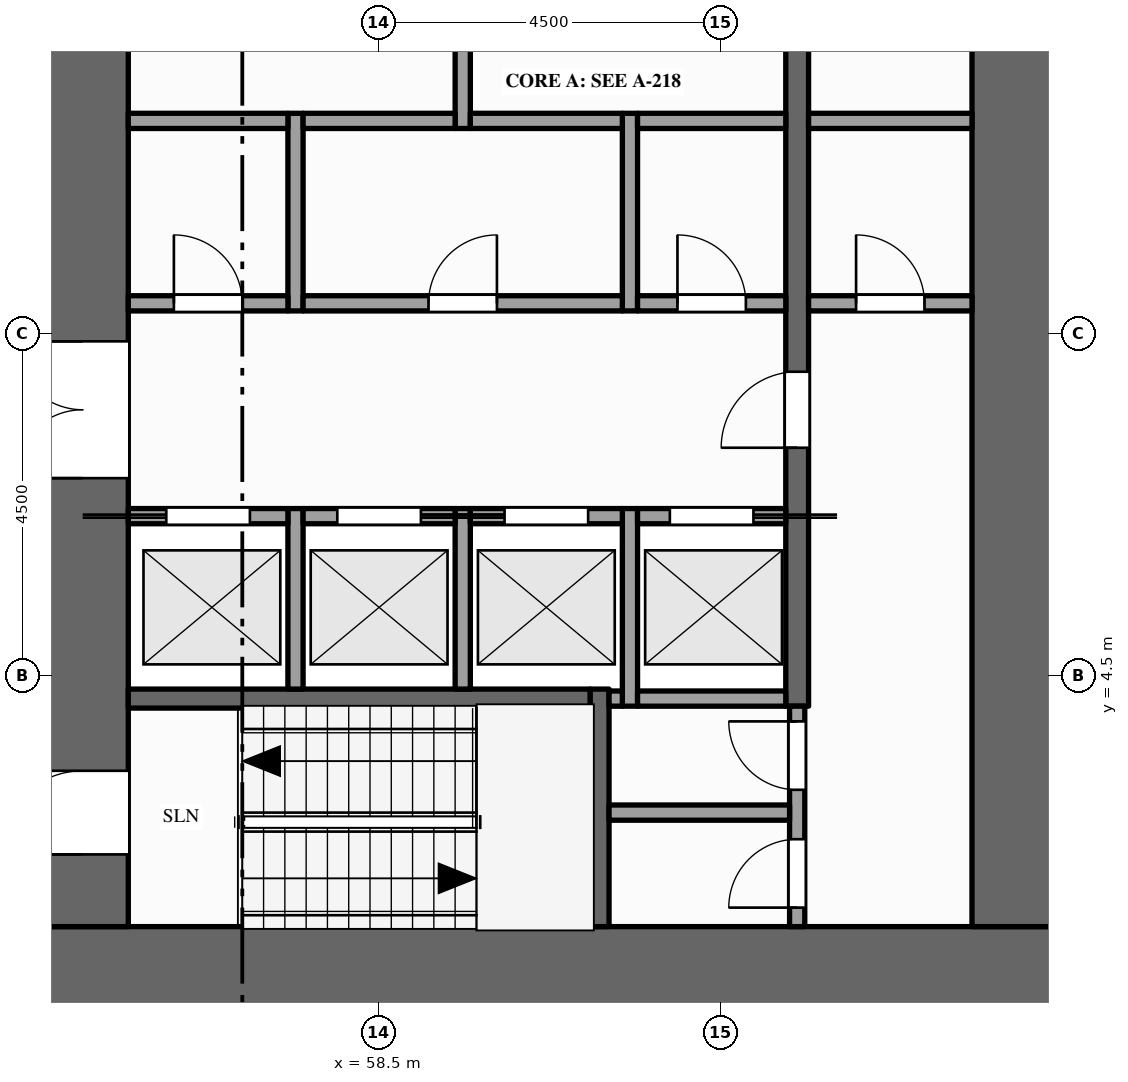
"""IFC4 building model, lengths in metres.
Left out: names, types, materials, properties, quantities, classifications, styles, units other than length and angle.
Written with IfcOpenShell. Run it as: python <this file> out.ifc"""

import sys

from ifc_helpers import new_model, si_unit, direction, frame, frame_2d, origin, place, context, subcontext, project, spatial, rectangle, extrude, element, fill, save


model = new_model("IFC4")
c1 = context("Model", 3, precision=1e-05, world=origin(), true_north=direction((0.0, 1.0)))
c2 = subcontext(c1, "Body", "Model", "MODEL_VIEW")
j1 = project(units=[si_unit("LENGTHUNIT", "METRE"), si_unit("PLANEANGLEUNIT", "RADIAN")], contexts=[c1])
p1 = place(None, origin())
s1 = spatial("IfcSite", under=j1, at=p1, CompositionType="ELEMENT")
p2 = place(p1, origin())
s2 = spatial("IfcBuilding", under=s1, at=p2, CompositionType="ELEMENT")
p3 = place(p2, frame((0.0, 0.0, 103.0)))
s3 = spatial("IfcBuildingStorey", under=s2, at=p3, CompositionType="ELEMENT", Elevation=103.0)
p4 = place(p3, frame((67.5, 0.6, -0.15), z_axis=(0.0, 0.0, 1.0), x_axis=(-1.0, 0.0, 0.0)))
e1 = element("IfcWall", 1, at=p4, inside=s3, PredefinedType="SHEAR", context=c2, shape_type="SweptSolid", body=[
    extrude(rectangle(XDim=13.5, YDim=1.2, at=frame_2d((6.75, 0.0))), origin(), (0.0, 0.0, 1.0), 4.0),
])
p5 = place(p3, frame((54.6, 1.2, -0.15), z_axis=(0.0, 0.0, 1.0), x_axis=(0.0, 1.0, 0.0)))
e2 = element("IfcWall", 2, at=p5, inside=s3, PredefinedType="SHEAR", context=c2, shape_type="SweptSolid", body=[
    extrude(rectangle(XDim=20.1, YDim=1.2, at=frame_2d((10.05, 0.0))), origin(), (0.0, 0.0, 1.0), 4.0),
])
p6 = place(p5, frame((5.9, 0.0, 0.15)))
e3 = element("IfcOpeningElement", 3, at=p6, cuts=e2, PredefinedType="OPENING", context=c2, shape_type="SweptSolid", body=[
    extrude(rectangle(XDim=1.8, YDim=2.1, at=frame_2d((0.9, 1.05))), frame((0.0, 0.61, 0.0), z_axis=(0.0, -1.0, 0.0), x_axis=(1.0, 0.0, 0.0)), (0.0, 0.0, 1.0), 1.22),
])
p7 = place(p5, frame((11.95, 0.0, 0.15)))
e4 = element("IfcOpeningElement", 4, at=p7, cuts=e2, PredefinedType="OPENING", context=c2, shape_type="SweptSolid", body=[
    extrude(rectangle(XDim=1.1, YDim=2.1, at=frame_2d((0.55, 1.05))), frame((0.0, 0.61, 0.0), z_axis=(0.0, -1.0, 0.0), x_axis=(1.0, 0.0, 0.0)), (0.0, 0.0, 1.0), 1.22),
])
p8 = place(p5, frame((0.95, 0.0, 0.15)))
e5 = element("IfcOpeningElement", 5, at=p8, cuts=e2, PredefinedType="OPENING", context=c2, shape_type="SweptSolid", body=[
    extrude(rectangle(XDim=1.1, YDim=2.1, at=frame_2d((0.55, 1.05))), frame((0.0, 0.61, 0.0), z_axis=(0.0, -1.0, 0.0), x_axis=(1.0, 0.0, 0.0)), (0.0, 0.0, 1.0), 1.22),
])
p9 = place(p5, frame((18.15, 0.0, 0.15)))
e6 = element("IfcOpeningElement", 6, at=p9, cuts=e2, PredefinedType="OPENING", context=c2, shape_type="SweptSolid", body=[
    extrude(rectangle(XDim=1.1, YDim=2.1, at=frame_2d((0.55, 1.05))), frame((0.0, 0.61, 0.0), z_axis=(0.0, -1.0, 0.0), x_axis=(1.0, 0.0, 0.0)), (0.0, 0.0, 1.0), 1.22),
])
p10 = place(p3, frame((66.9, 1.2, -0.15), z_axis=(0.0, 0.0, 1.0), x_axis=(0.0, 1.0, 0.0)))
e7 = element("IfcWall", 7, at=p10, inside=s3, PredefinedType="SHEAR", context=c2, shape_type="SweptSolid", body=[
    extrude(rectangle(XDim=20.1, YDim=1.2, at=frame_2d((10.05, 0.0))), origin(), (0.0, 0.0, 1.0), 4.0),
])
p11 = place(p3, frame((57.4, 4.325, 0.0), z_axis=(0.0, 0.0, 1.0), x_axis=(0.0, 1.0, 0.0)))
e8 = element("IfcWall", 8, at=p11, inside=s3, PredefinedType="SOLIDWALL", context=c2, shape_type="SweptSolid", body=[
    extrude(rectangle(XDim=2.375, YDim=0.2, at=frame_2d((1.188, 0.0))), origin(), (0.0, 0.0, 1.0), 3.85),
])
p12 = place(p3, frame((57.4, 9.3, 0.0), z_axis=(0.0, 0.0, 1.0), x_axis=(0.0, 1.0, 0.0)))
e9 = element("IfcWall", 9, at=p12, inside=s3, PredefinedType="PARTITIONING", context=c2, shape_type="SweptSolid", body=[
    extrude(rectangle(XDim=2.6, YDim=0.2, at=frame_2d((1.3, 0.0))), origin(), (0.0, 0.0, 1.0), 3.85),
])
p13 = place(p3, frame((59.6, 4.325, 0.0), z_axis=(0.0, 0.0, 1.0), x_axis=(0.0, 1.0, 0.0)))
e10 = element("IfcWall", 10, at=p13, inside=s3, PredefinedType="SOLIDWALL", context=c2, shape_type="SweptSolid", body=[
    extrude(rectangle(XDim=2.375, YDim=0.2, at=frame_2d((1.188, 0.0))), origin(), (0.0, 0.0, 1.0), 3.85),
])
p14 = place(p3, frame((59.6, 11.7, 0.0), z_axis=(0.0, 0.0, 1.0), x_axis=(0.0, 1.0, 0.0)))
e11 = element("IfcWall", 11, at=p14, inside=s3, PredefinedType="PARTITIONING", context=c2, shape_type="SweptSolid", body=[
    extrude(rectangle(XDim=3.8, YDim=0.2, at=frame_2d((1.9, 0.0))), origin(), (0.0, 0.0, 1.0), 3.85),
])
p15 = place(p14, frame((1.5, 0.0, 0.0)))
e12 = element("IfcOpeningElement", 12, at=p15, cuts=e11, PredefinedType="OPENING", context=c2, shape_type="SweptSolid", body=[
    extrude(rectangle(XDim=1.0, YDim=2.1, at=frame_2d((0.5, 1.05))), frame((0.0, 0.11, 0.0), z_axis=(0.0, -1.0, 0.0), x_axis=(1.0, 0.0, 0.0)), (0.0, 0.0, 1.0), 0.22),
])
p16 = place(p3, frame((61.4, 1.2, 0.0), z_axis=(0.0, 0.0, 1.0), x_axis=(0.0, 1.0, 0.0)))
e13 = element("IfcWall", 13, at=p16, inside=s3, PredefinedType="SHEAR", context=c2, shape_type="SweptSolid", body=[
    extrude(rectangle(XDim=3.125, YDim=0.25, at=frame_2d((1.562, 0.0))), origin(), (0.0, 0.0, 1.0), 3.85),
])
p17 = place(p3, frame((61.8, 4.1, 0.0), z_axis=(0.0, 0.0, 1.0), x_axis=(0.0, 1.0, 0.0)))
e14 = element("IfcWall", 14, at=p17, inside=s3, PredefinedType="SOLIDWALL", context=c2, shape_type="SweptSolid", body=[
    extrude(rectangle(XDim=2.6, YDim=0.2, at=frame_2d((1.3, 0.0))), origin(), (0.0, 0.0, 1.0), 3.85),
])
p18 = place(p3, frame((61.8, 9.3, 0.0), z_axis=(0.0, 0.0, 1.0), x_axis=(0.0, 1.0, 0.0)))
e15 = element("IfcWall", 15, at=p18, inside=s3, PredefinedType="PARTITIONING", context=c2, shape_type="SweptSolid", body=[
    extrude(rectangle(XDim=2.6, YDim=0.2, at=frame_2d((1.3, 0.0))), origin(), (0.0, 0.0, 1.0), 3.85),
])
p19 = place(p3, frame((64.0, 1.2, 0.0), z_axis=(0.0, 0.0, 1.0), x_axis=(0.0, 1.0, 0.0)))
e16 = element("IfcWall", 16, at=p19, inside=s3, PredefinedType="PARTITIONING", context=c2, shape_type="SweptSolid", body=[
    extrude(rectangle(XDim=2.9, YDim=0.2, at=frame_2d((1.45, 0.0))), origin(), (0.0, 0.0, 1.0), 3.85),
])
p20 = place(p19, frame((0.25, 0.0, 0.0)))
e17 = element("IfcOpeningElement", 17, at=p20, cuts=e16, PredefinedType="OPENING", context=c2, shape_type="SweptSolid", body=[
    extrude(rectangle(XDim=0.9, YDim=2.1, at=frame_2d((0.45, 1.05))), frame((0.0, 0.11, 0.0), z_axis=(0.0, -1.0, 0.0), x_axis=(1.0, 0.0, 0.0)), (0.0, 0.0, 1.0), 0.22),
])
p21 = place(p19, frame((1.8, 0.0, 0.0)))
e18 = element("IfcOpeningElement", 18, at=p21, cuts=e16, PredefinedType="OPENING", context=c2, shape_type="SweptSolid", body=[
    extrude(rectangle(XDim=0.9, YDim=2.1, at=frame_2d((0.45, 1.05))), frame((0.0, 0.11, 0.0), z_axis=(0.0, -1.0, 0.0), x_axis=(1.0, 0.0, 0.0)), (0.0, 0.0, 1.0), 0.22),
])
p22 = place(p3, frame((64.0, 4.1, 0.0), z_axis=(0.0, 0.0, 1.0), x_axis=(0.0, 1.0, 0.0)))
e19 = element("IfcWall", 19, at=p22, inside=s3, PredefinedType="SHEAR", context=c2, shape_type="SweptSolid", body=[
    extrude(rectangle(XDim=14.5, YDim=0.3, at=frame_2d((7.25, 0.0))), origin(), (0.0, 0.0, 1.0), 3.85),
])
p23 = place(p22, frame((3.4, 0.0, 0.0)))
e20 = element("IfcOpeningElement", 20, at=p23, cuts=e19, PredefinedType="OPENING", context=c2, shape_type="SweptSolid", body=[
    extrude(rectangle(XDim=1.0, YDim=2.1, at=frame_2d((0.5, 1.05))), frame((0.0, 0.16, 0.0), z_axis=(0.0, -1.0, 0.0), x_axis=(1.0, 0.0, 0.0)), (0.0, 0.0, 1.0), 0.32),
])
p24 = place(p22, frame((9.1, 0.0, 0.0)))
e21 = element("IfcOpeningElement", 21, at=p24, cuts=e19, PredefinedType="OPENING", context=c2, shape_type="SweptSolid", body=[
    extrude(rectangle(XDim=1.0, YDim=2.1, at=frame_2d((0.5, 1.05))), frame((0.0, 0.16, 0.0), z_axis=(0.0, -1.0, 0.0), x_axis=(1.0, 0.0, 0.0)), (0.0, 0.0, 1.0), 0.32),
])
p25 = place(p3, frame((61.525, 2.7, 0.0), z_axis=(0.0, 0.0, 1.0), x_axis=(1.0, 0.0, 0.0)))
e22 = element("IfcWall", 22, at=p25, inside=s3, PredefinedType="PARTITIONING", context=c2, shape_type="SweptSolid", body=[
    extrude(rectangle(XDim=2.375, YDim=0.2, at=frame_2d((1.188, 0.0))), origin(), (0.0, 0.0, 1.0), 3.85),
])
p26 = place(p3, frame((55.2, 4.2, 0.0), z_axis=(0.0, 0.0, 1.0), x_axis=(1.0, 0.0, 0.0)))
e23 = element("IfcWall", 23, at=p26, inside=s3, PredefinedType="SHEAR", context=c2, shape_type="SweptSolid", body=[
    extrude(rectangle(XDim=6.075, YDim=0.25, at=frame_2d((3.038, 0.0))), origin(), (0.0, 0.0, 1.0), 3.85),
])
p27 = place(p3, frame((61.525, 4.2, 0.0), z_axis=(0.0, 0.0, 1.0), x_axis=(1.0, 0.0, 0.0)))
e24 = element("IfcWall", 24, at=p27, inside=s3, PredefinedType="SOLIDWALL", context=c2, shape_type="SweptSolid", body=[
    extrude(rectangle(XDim=0.175, YDim=0.2, at=frame_2d((0.087, 0.0))), origin(), (0.0, 0.0, 1.0), 3.85),
])
p28 = place(p3, frame((61.9, 4.2, 0.0), z_axis=(0.0, 0.0, 1.0), x_axis=(1.0, 0.0, 0.0)))
e25 = element("IfcWall", 25, at=p28, inside=s3, PredefinedType="SOLIDWALL", context=c2, shape_type="SweptSolid", body=[
    extrude(rectangle(XDim=1.95, YDim=0.2, at=frame_2d((0.975, 0.0))), origin(), (0.0, 0.0, 1.0), 3.85),
])
p29 = place(p3, frame((55.2, 6.6, 0.0), z_axis=(0.0, 0.0, 1.0), x_axis=(1.0, 0.0, 0.0)))
e26 = element("IfcWall", 26, at=p29, inside=s3, PredefinedType="SOLIDWALL", context=c2, shape_type="SweptSolid", body=[
    extrude(rectangle(XDim=2.1, YDim=0.2, at=frame_2d((1.05, 0.0))), origin(), (0.0, 0.0, 1.0), 3.85),
])
p30 = place(p29, frame((0.5, 0.0, 0.012)))
e27 = element("IfcOpeningElement", 27, at=p30, cuts=e26, PredefinedType="OPENING", context=c2, shape_type="SweptSolid", body=[
    extrude(rectangle(XDim=1.1, YDim=2.1, at=frame_2d((0.55, 1.05))), frame((0.0, 0.11, 0.0), z_axis=(0.0, -1.0, 0.0), x_axis=(1.0, 0.0, 0.0)), (0.0, 0.0, 1.0), 0.22),
])
p31 = place(p3, frame((57.5, 6.6, 0.0), z_axis=(0.0, 0.0, 1.0), x_axis=(1.0, 0.0, 0.0)))
e28 = element("IfcWall", 28, at=p31, inside=s3, PredefinedType="SOLIDWALL", context=c2, shape_type="SweptSolid", body=[
    extrude(rectangle(XDim=2.0, YDim=0.2, at=frame_2d((1.0, 0.0))), origin(), (0.0, 0.0, 1.0), 3.85),
])
p32 = place(p31, frame((0.45, 0.0, 0.012)))
e29 = element("IfcOpeningElement", 29, at=p32, cuts=e28, PredefinedType="OPENING", context=c2, shape_type="SweptSolid", body=[
    extrude(rectangle(XDim=1.1, YDim=2.1, at=frame_2d((0.55, 1.05))), frame((0.0, 0.11, 0.0), z_axis=(0.0, -1.0, 0.0), x_axis=(1.0, 0.0, 0.0)), (0.0, 0.0, 1.0), 0.22),
])
p33 = place(p3, frame((59.7, 6.6, 0.0), z_axis=(0.0, 0.0, 1.0), x_axis=(1.0, 0.0, 0.0)))
e30 = element("IfcWall", 30, at=p33, inside=s3, PredefinedType="SOLIDWALL", context=c2, shape_type="SweptSolid", body=[
    extrude(rectangle(XDim=2.0, YDim=0.2, at=frame_2d((1.0, 0.0))), origin(), (0.0, 0.0, 1.0), 3.85),
])
p34 = place(p33, frame((0.45, 0.0, 0.012)))
e31 = element("IfcOpeningElement", 31, at=p34, cuts=e30, PredefinedType="OPENING", context=c2, shape_type="SweptSolid", body=[
    extrude(rectangle(XDim=1.1, YDim=2.1, at=frame_2d((0.55, 1.05))), frame((0.0, 0.11, 0.0), z_axis=(0.0, -1.0, 0.0), x_axis=(1.0, 0.0, 0.0)), (0.0, 0.0, 1.0), 0.22),
])
p35 = place(p3, frame((61.9, 6.6, 0.0), z_axis=(0.0, 0.0, 1.0), x_axis=(1.0, 0.0, 0.0)))
e32 = element("IfcWall", 32, at=p35, inside=s3, PredefinedType="SOLIDWALL", context=c2, shape_type="SweptSolid", body=[
    extrude(rectangle(XDim=1.95, YDim=0.2, at=frame_2d((0.975, 0.0))), origin(), (0.0, 0.0, 1.0), 3.85),
])
p36 = place(p35, frame((0.425, 0.0, 0.012)))
e33 = element("IfcOpeningElement", 33, at=p36, cuts=e32, PredefinedType="OPENING", context=c2, shape_type="SweptSolid", body=[
    extrude(rectangle(XDim=1.1, YDim=2.1, at=frame_2d((0.55, 1.05))), frame((0.0, 0.11, 0.0), z_axis=(0.0, -1.0, 0.0), x_axis=(1.0, 0.0, 0.0)), (0.0, 0.0, 1.0), 0.22),
])
p37 = place(p3, frame((55.2, 9.4, 0.0), z_axis=(0.0, 0.0, 1.0), x_axis=(1.0, 0.0, 0.0)))
e34 = element("IfcWall", 34, at=p37, inside=s3, PredefinedType="PARTITIONING", context=c2, shape_type="SweptSolid", body=[
    extrude(rectangle(XDim=2.1, YDim=0.2, at=frame_2d((1.05, 0.0))), origin(), (0.0, 0.0, 1.0), 3.85),
])
p38 = place(p37, frame((0.6, 0.0, 0.0)))
e35 = element("IfcOpeningElement", 35, at=p38, cuts=e34, PredefinedType="OPENING", context=c2, shape_type="SweptSolid", body=[
    extrude(rectangle(XDim=0.9, YDim=2.1, at=frame_2d((0.45, 1.05))), frame((0.0, 0.11, 0.0), z_axis=(0.0, -1.0, 0.0), x_axis=(1.0, 0.0, 0.0)), (0.0, 0.0, 1.0), 0.22),
])
p39 = place(p3, frame((57.5, 9.4, 0.0), z_axis=(0.0, 0.0, 1.0), x_axis=(1.0, 0.0, 0.0)))
e36 = element("IfcWall", 36, at=p39, inside=s3, PredefinedType="PARTITIONING", context=c2, shape_type="SweptSolid", body=[
    extrude(rectangle(XDim=4.2, YDim=0.2, at=frame_2d((2.1, 0.0))), origin(), (0.0, 0.0, 1.0), 3.85),
])
p40 = place(p39, frame((1.65, 0.0, 0.0)))
e37 = element("IfcOpeningElement", 37, at=p40, cuts=e36, PredefinedType="OPENING", context=c2, shape_type="SweptSolid", body=[
    extrude(rectangle(XDim=0.9, YDim=2.1, at=frame_2d((0.45, 1.05))), frame((0.0, 0.11, 0.0), z_axis=(0.0, -1.0, 0.0), x_axis=(1.0, 0.0, 0.0)), (0.0, 0.0, 1.0), 0.22),
])
p41 = place(p3, frame((61.9, 9.4, 0.0), z_axis=(0.0, 0.0, 1.0), x_axis=(1.0, 0.0, 0.0)))
e38 = element("IfcWall", 38, at=p41, inside=s3, PredefinedType="PARTITIONING", context=c2, shape_type="SweptSolid", body=[
    extrude(rectangle(XDim=1.95, YDim=0.2, at=frame_2d((0.975, 0.0))), origin(), (0.0, 0.0, 1.0), 3.85),
])
p42 = place(p41, frame((0.525, 0.0, 0.0)))
e39 = element("IfcOpeningElement", 39, at=p42, cuts=e38, PredefinedType="OPENING", context=c2, shape_type="SweptSolid", body=[
    extrude(rectangle(XDim=0.9, YDim=2.1, at=frame_2d((0.45, 1.05))), frame((0.0, 0.11, 0.0), z_axis=(0.0, -1.0, 0.0), x_axis=(1.0, 0.0, 0.0)), (0.0, 0.0, 1.0), 0.22),
])
p43 = place(p3, frame((64.15, 9.4, 0.0), z_axis=(0.0, 0.0, 1.0), x_axis=(1.0, 0.0, 0.0)))
e40 = element("IfcWall", 40, at=p43, inside=s3, PredefinedType="PARTITIONING", context=c2, shape_type="SweptSolid", body=[
    extrude(rectangle(XDim=2.15, YDim=0.2, at=frame_2d((1.075, 0.0))), origin(), (0.0, 0.0, 1.0), 3.85),
])
p44 = place(p43, frame((0.625, 0.0, 0.0)))
e41 = element("IfcOpeningElement", 41, at=p44, cuts=e40, PredefinedType="OPENING", context=c2, shape_type="SweptSolid", body=[
    extrude(rectangle(XDim=0.9, YDim=2.1, at=frame_2d((0.45, 1.05))), frame((0.0, 0.11, 0.0), z_axis=(0.0, -1.0, 0.0), x_axis=(1.0, 0.0, 0.0)), (0.0, 0.0, 1.0), 0.22),
])
p45 = place(p3, frame((55.2, 11.8, 0.0), z_axis=(0.0, 0.0, 1.0), x_axis=(1.0, 0.0, 0.0)))
e42 = element("IfcWall", 42, at=p45, inside=s3, PredefinedType="PARTITIONING", context=c2, shape_type="SweptSolid", body=[
    extrude(rectangle(XDim=2.1, YDim=0.2, at=frame_2d((1.05, 0.0))), origin(), (0.0, 0.0, 1.0), 3.85),
])
for number, where, z_axis, x_axis in (
    (43, (57.5, 11.8, 0.0), (0.0, 0.0, 1.0), (1.0, 0.0, 0.0)),
    (44, (59.7, 11.8, 0.0), (0.0, 0.0, 1.0), (1.0, 0.0, 0.0)),
):
    element("IfcWall", number, at=place(p3, frame(where, z_axis=z_axis, x_axis=x_axis)), inside=s3, PredefinedType="PARTITIONING", context=c2, shape_type="SweptSolid", body=[
        extrude(rectangle(XDim=2.0, YDim=0.2, at=frame_2d((1.0, 0.0))), origin(), (0.0, 0.0, 1.0), 3.85),
    ])
p46 = place(p3, frame((61.9, 11.8, 0.0), z_axis=(0.0, 0.0, 1.0), x_axis=(1.0, 0.0, 0.0)))
e45 = element("IfcWall", 45, at=p46, inside=s3, PredefinedType="PARTITIONING", context=c2, shape_type="SweptSolid", body=[
    extrude(rectangle(XDim=1.95, YDim=0.2, at=frame_2d((0.975, 0.0))), origin(), (0.0, 0.0, 1.0), 3.85),
])
p47 = place(p3, frame((64.15, 11.8, 0.0), z_axis=(0.0, 0.0, 1.0), x_axis=(1.0, 0.0, 0.0)))
e46 = element("IfcWall", 46, at=p47, inside=s3, PredefinedType="PARTITIONING", context=c2, shape_type="SweptSolid", body=[
    extrude(rectangle(XDim=2.15, YDim=0.2, at=frame_2d((1.075, 0.0))), origin(), (0.0, 0.0, 1.0), 3.85),
])
p48 = place(p30, origin())
e47 = element("IfcDoor", 47, at=p48, inside=s3, OperationType="SLIDING_TO_LEFT", PredefinedType="DOOR", context=c2, shape_type="SweptSolid", body=[
    extrude(rectangle(XDim=1.1, YDim=2.1, at=frame_2d((0.55, 1.05))), frame((0.0, 0.025, 0.0), z_axis=(0.0, -1.0, 0.0), x_axis=(1.0, 0.0, 0.0)), (0.0, 0.0, 1.0), 0.05),
])
fill(e27, e47)
p49 = place(p32, origin())
e48 = element("IfcDoor", 48, at=p49, inside=s3, OperationType="SLIDING_TO_RIGHT", PredefinedType="DOOR", context=c2, shape_type="SweptSolid", body=[
    extrude(rectangle(XDim=1.1, YDim=2.1, at=frame_2d((0.55, 1.05))), frame((0.0, 0.025, 0.0), z_axis=(0.0, -1.0, 0.0), x_axis=(1.0, 0.0, 0.0)), (0.0, 0.0, 1.0), 0.05),
])
fill(e29, e48)
p50 = place(p34, origin())
e49 = element("IfcDoor", 49, at=p50, inside=s3, OperationType="SLIDING_TO_LEFT", PredefinedType="DOOR", context=c2, shape_type="SweptSolid", body=[
    extrude(rectangle(XDim=1.1, YDim=2.1, at=frame_2d((0.55, 1.05))), frame((0.0, 0.025, 0.0), z_axis=(0.0, -1.0, 0.0), x_axis=(1.0, 0.0, 0.0)), (0.0, 0.0, 1.0), 0.05),
])
fill(e31, e49)
p51 = place(p36, origin())
e50 = element("IfcDoor", 50, at=p51, inside=s3, OperationType="SLIDING_TO_RIGHT", PredefinedType="DOOR", context=c2, shape_type="SweptSolid", body=[
    extrude(rectangle(XDim=1.1, YDim=2.1, at=frame_2d((0.55, 1.05))), frame((0.0, 0.025, 0.0), z_axis=(0.0, -1.0, 0.0), x_axis=(1.0, 0.0, 0.0)), (0.0, 0.0, 1.0), 0.05),
])
fill(e33, e50)
p52 = place(p6, origin())
e51 = element("IfcDoor", 51, at=p52, inside=s3, OperationType="DOUBLE_DOOR_SINGLE_SWING", PredefinedType="DOOR", context=c2, shape_type="SweptSolid", body=[
    extrude(rectangle(XDim=1.8, YDim=2.1, at=frame_2d((0.9, 1.05))), frame((0.0, 0.025, 0.0), z_axis=(0.0, -1.0, 0.0), x_axis=(1.0, 0.0, 0.0)), (0.0, 0.0, 1.0), 0.05),
])
fill(e3, e51)
p53 = place(p23, origin())
e52 = element("IfcDoor", 52, at=p53, inside=s3, OperationType="SINGLE_SWING_LEFT", PredefinedType="DOOR", context=c2, shape_type="SweptSolid", body=[
    extrude(rectangle(XDim=1.0, YDim=2.1, at=frame_2d((0.5, 1.05))), frame((0.0, 0.025, 0.0), z_axis=(0.0, -1.0, 0.0), x_axis=(1.0, 0.0, 0.0)), (0.0, 0.0, 1.0), 0.05),
])
fill(e20, e52)
p54 = place(p44, origin())
e53 = element("IfcDoor", 53, at=p54, inside=s3, OperationType="SINGLE_SWING_LEFT", PredefinedType="DOOR", context=c2, shape_type="SweptSolid", body=[
    extrude(rectangle(XDim=0.9, YDim=2.1, at=frame_2d((0.45, 1.05))), frame((0.0, 0.025, 0.0), z_axis=(0.0, -1.0, 0.0), x_axis=(1.0, 0.0, 0.0)), (0.0, 0.0, 1.0), 0.05),
])
fill(e41, e53)
p55 = place(p8, origin())
e54 = element("IfcDoor", 54, at=p55, inside=s3, OperationType="SINGLE_SWING_LEFT", PredefinedType="DOOR", context=c2, shape_type="SweptSolid", body=[
    extrude(rectangle(XDim=1.1, YDim=2.1, at=frame_2d((0.55, 1.05))), frame((0.0, 0.025, 0.0), z_axis=(0.0, -1.0, 0.0), x_axis=(1.0, 0.0, 0.0)), (0.0, 0.0, 1.0), 0.05),
])
fill(e5, e54)
p56 = place(p20, origin())
e55 = element("IfcDoor", 55, at=p56, inside=s3, OperationType="SINGLE_SWING_LEFT", PredefinedType="DOOR", context=c2, shape_type="SweptSolid", body=[
    extrude(rectangle(XDim=0.9, YDim=2.1, at=frame_2d((0.45, 1.05))), frame((0.0, 0.025, 0.0), z_axis=(0.0, -1.0, 0.0), x_axis=(1.0, 0.0, 0.0)), (0.0, 0.0, 1.0), 0.05),
])
fill(e17, e55)
p57 = place(p21, origin())
e56 = element("IfcDoor", 56, at=p57, inside=s3, OperationType="SINGLE_SWING_RIGHT", PredefinedType="DOOR", context=c2, shape_type="SweptSolid", body=[
    extrude(rectangle(XDim=0.9, YDim=2.1, at=frame_2d((0.45, 1.05))), frame((0.0, 0.025, 0.0), z_axis=(0.0, -1.0, 0.0), x_axis=(1.0, 0.0, 0.0)), (0.0, 0.0, 1.0), 0.05),
])
fill(e18, e56)
p58 = place(p38, origin())
e57 = element("IfcDoor", 57, at=p58, inside=s3, OperationType="SINGLE_SWING_LEFT", PredefinedType="DOOR", context=c2, shape_type="SweptSolid", body=[
    extrude(rectangle(XDim=0.9, YDim=2.1, at=frame_2d((0.45, 1.05))), frame((0.0, 0.025, 0.0), z_axis=(0.0, -1.0, 0.0), x_axis=(1.0, 0.0, 0.0)), (0.0, 0.0, 1.0), 0.05),
])
fill(e35, e57)
p59 = place(p40, origin())
e58 = element("IfcDoor", 58, at=p59, inside=s3, OperationType="SINGLE_SWING_RIGHT", PredefinedType="DOOR", context=c2, shape_type="SweptSolid", body=[
    extrude(rectangle(XDim=0.9, YDim=2.1, at=frame_2d((0.45, 1.05))), frame((0.0, 0.025, 0.0), z_axis=(0.0, -1.0, 0.0), x_axis=(1.0, 0.0, 0.0)), (0.0, 0.0, 1.0), 0.05),
])
fill(e37, e58)
p60 = place(p42, origin())
e59 = element("IfcDoor", 59, at=p60, inside=s3, OperationType="SINGLE_SWING_LEFT", PredefinedType="DOOR", context=c2, shape_type="SweptSolid", body=[
    extrude(rectangle(XDim=0.9, YDim=2.1, at=frame_2d((0.45, 1.05))), frame((0.0, 0.025, 0.0), z_axis=(0.0, -1.0, 0.0), x_axis=(1.0, 0.0, 0.0)), (0.0, 0.0, 1.0), 0.05),
])
fill(e39, e59)
save(model, sys.argv[1])
